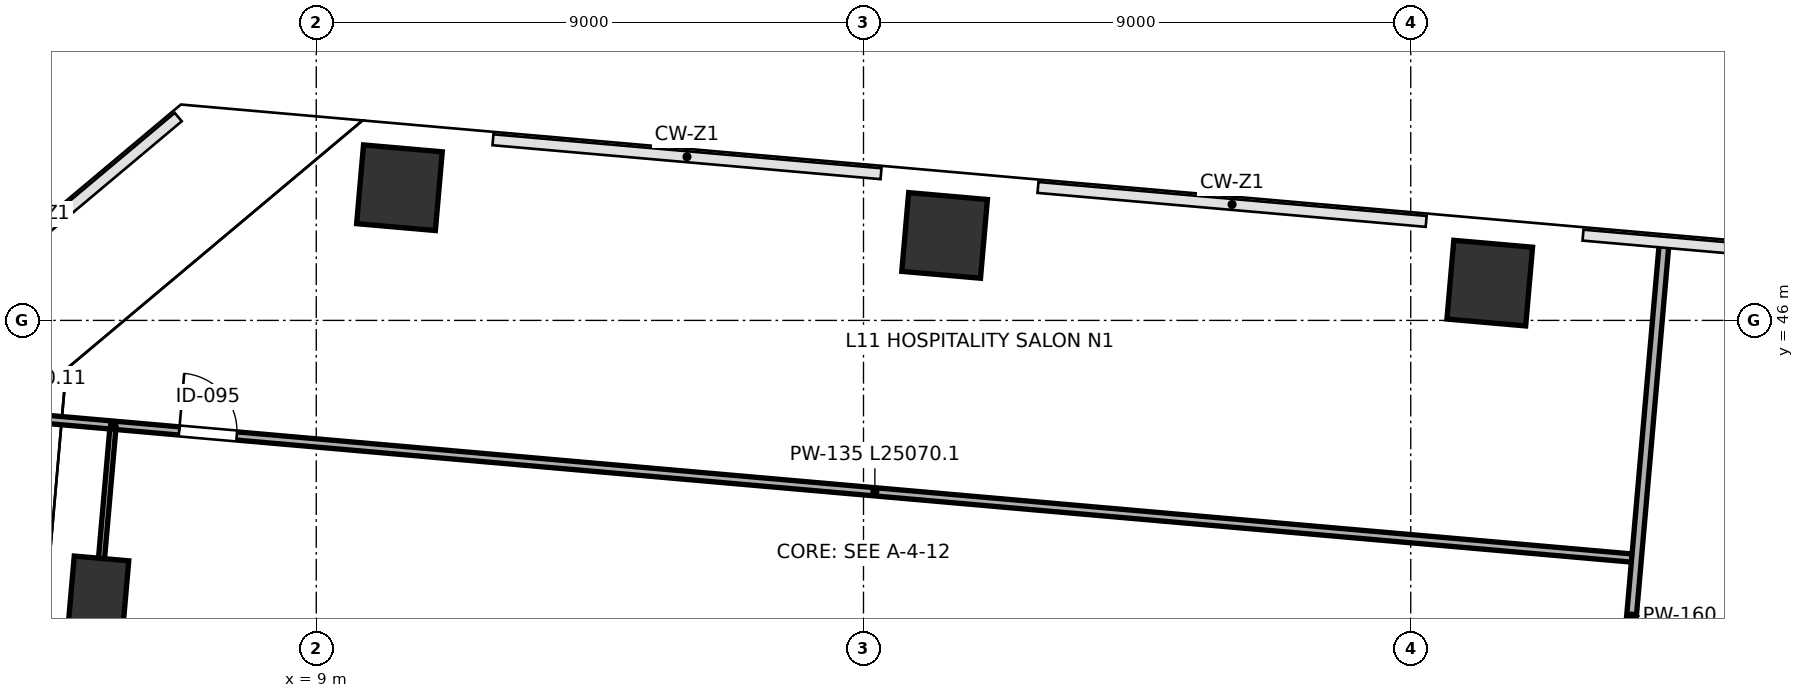
"""IFC4 building model, lengths in metres.
Left out: names, types, materials, properties, quantities, classifications, styles, units other than length and angle.
Written with IfcOpenShell. Run it as: python <this file> out.ifc"""

import sys

from ifc_helpers import new_model, si_unit, direction, frame, frame_2d, origin, origin_2d, place, context, subcontext, project, spatial, rectangle, extrude, clip, halfspace, source, transform, mapped, element, fill, save


model = new_model("IFC4")
c1 = context("Model", 3, precision=1e-05, world=origin(), true_north=direction((0.0, 1.0)))
c2 = subcontext(c1, "Body", "Model", "MODEL_VIEW")
j1 = project(units=[si_unit("LENGTHUNIT", "METRE"), si_unit("PLANEANGLEUNIT", "RADIAN")], contexts=[c1])
p1 = place(None, origin())
s1 = spatial("IfcSite", under=j1, at=p1, CompositionType="ELEMENT")
p2 = place(p1, origin())
s2 = spatial("IfcBuilding", under=s1, at=p2, CompositionType="ELEMENT")
p3 = place(p2, frame((0.0, 0.0, 52.0)))
s3 = spatial("IfcBuildingStorey", under=s2, at=p3, CompositionType="ELEMENT", Elevation=52.0)
p4 = place(p3, frame((10.368, 48.182, 0.0), z_axis=(0.073812496788, 0.049596729139, 0.996038091529), x_axis=(0.483542762655, -0.875286424907, 0.007750552098)))
e1 = element("IfcColumn", 1, at=p4, inside=s3, PredefinedType="COLUMN", context=c2, shape_type="Clipping", body=[
    clip(clip(extrude(rectangle(XDim=1.3, YDim=1.3, at=origin_2d()), origin(), (0.0, 0.0, 1.0), 4.819), halfspace(frame((0.0, 0.0, 0.063), z_axis=(0.0, 0.0, -1.0), x_axis=(1.0, 0.0, 0.0)), False)), halfspace(frame((0.0, 0.0, 4.756), z_axis=(0.0, 0.0, 1.0), x_axis=(1.0, 0.0, 0.0)), False)),
])
p5 = place(p3, frame((19.334, 47.397, 0.0), z_axis=(0.06991362438, 0.009030932612, 0.99751216904), x_axis=(0.041398310106, -0.999123831761, 0.006143999325)))
e2 = element("IfcColumn", 2, at=p5, inside=s3, PredefinedType="COLUMN", context=c2, shape_type="Clipping", body=[
    clip(clip(extrude(rectangle(XDim=1.3, YDim=1.3, at=origin_2d()), origin(), (0.0, 0.0, 1.0), 4.812), halfspace(frame((0.0, 0.0, 0.051), z_axis=(0.0, 0.0, -1.0), x_axis=(1.0, 0.0, 0.0)), False)), halfspace(frame((0.0, 0.0, 4.761), z_axis=(0.0, 0.0, 1.0), x_axis=(1.0, 0.0, 0.0)), False)),
])
p6 = place(p3, frame((28.3, 46.613, 0.0), z_axis=(0.06589332662, -0.031551692962, 0.997327709521), x_axis=(-0.508628404155, -0.860962602344, 0.006367405439)))
e3 = element("IfcColumn", 3, at=p6, inside=s3, PredefinedType="COLUMN", context=c2, shape_type="Clipping", body=[
    clip(clip(extrude(rectangle(XDim=1.3, YDim=1.3, at=origin_2d()), origin(), (0.0, 0.0, 1.0), 4.813), halfspace(frame((0.0, 0.0, 0.052), z_axis=(0.0, 0.0, -1.0), x_axis=(1.0, 0.0, 0.0)), False)), halfspace(frame((0.0, 0.0, 4.761), z_axis=(0.0, 0.0, 1.0), x_axis=(1.0, 0.0, 0.0)), False)),
])
p7 = place(p3, frame((5.411, 41.438, 0.0), z_axis=(0.0435342962, 0.072422013119, 0.996423512905), x_axis=(0.809065713617, -0.587672045735, 0.007364625673)))
e4 = element("IfcColumn", 4, at=p7, inside=s3, PredefinedType="PILASTER", context=c2, shape_type="Clipping", body=[
    clip(clip(extrude(rectangle(XDim=0.9, YDim=1.3, at=origin_2d()), origin(), (0.0, 0.0, 1.0), 4.817), halfspace(frame((0.0, 0.0, 0.059), z_axis=(0.0, 0.0, -1.0), x_axis=(1.0, 0.0, 0.0)), False)), halfspace(frame((0.0, 0.0, 4.758), z_axis=(0.0, 0.0, 1.0), x_axis=(1.0, 0.0, 0.0)), False)),
])
p8 = place(p3, frame((5.7, 44.274, 0.0), z_axis=(0.0, 0.0, 1.0), x_axis=(0.996195324028, -0.087148587968, 0.0)))
e5 = element("IfcWall", 5, at=p8, inside=s3, PredefinedType="PARTITIONING", context=c2, shape_type="SweptSolid", body=[
    extrude(rectangle(XDim=25.07, YDim=0.135, at=frame_2d((12.535, 0.0))), origin(), (0.0, 0.0, 1.0), 4.56),
])
p9 = place(p8, frame((1.05, 0.0, 0.0)))
e6 = element("IfcOpeningElement", 6, at=p9, cuts=e5, PredefinedType="OPENING", context=c2, shape_type="SweptSolid", body=[
    extrude(rectangle(XDim=0.95, YDim=2.15, at=frame_2d((0.475, 1.075))), frame((0.0, 0.078, 0.0), z_axis=(0.0, -1.0, 0.0), x_axis=(1.0, 0.0, 0.0)), (0.0, 0.0, 1.0), 0.155),
])
p10 = place(p3, frame((3.61, 20.847, 0.0), z_axis=(0.0, 0.0, 1.0), x_axis=(0.087153664928, 0.996194879875, 0.0)))
e7 = element("IfcWall", 7, at=p10, inside=s3, PredefinedType="PARTITIONING", context=c2, shape_type="SweptSolid", body=[
    extrude(rectangle(XDim=23.48, YDim=0.1, at=frame_2d((11.74, 0.0))), origin(), (0.0, 0.0, 1.0), 3.395),
])
p11 = place(p10, frame((1.4, 0.0, 0.0)))
e8 = element("IfcOpeningElement", 8, at=p11, cuts=e7, PredefinedType="OPENING", context=c2, shape_type="SweptSolid", body=[
    extrude(rectangle(XDim=0.95, YDim=2.15, at=frame_2d((0.475, 1.075))), frame((0.0, 0.06, 0.0), z_axis=(0.0, -1.0, 0.0), x_axis=(1.0, 0.0, 0.0)), (0.0, 0.0, 1.0), 0.12),
])
p12 = place(p3, frame((2.004, 44.597, 0.0), z_axis=(0.0, 0.0, 1.0), x_axis=(0.996194520424, -0.087157773474, 0.0)))
e9 = element("IfcWall", 9, at=p12, inside=s3, PredefinedType="PARTITIONING", context=c2, shape_type="SweptSolid", body=[
    extrude(rectangle(XDim=3.63, YDim=0.135, at=frame_2d((1.815, 0.0))), origin(), (0.0, 0.0, 1.0), 4.56),
])
p13 = place(p3, frame((30.098, 35.042, 0.0), z_axis=(0.0, 0.0, 1.0), x_axis=(0.087145176091, 0.996195622498, 0.0)))
e10 = element("IfcWall", 10, at=p13, inside=s3, PredefinedType="PARTITIONING", context=c2, shape_type="SweptSolid", body=[
    extrude(rectangle(XDim=12.24, YDim=0.16, at=frame_2d((6.12, 0.0))), origin(), (0.0, 0.0, 1.0), 3.695),
])
m1 = source(origin(), c2, "Body", "SweptSolid", [
    extrude(rectangle(XDim=0.95, YDim=2.15, at=frame_2d((0.475, 1.075))), frame((0.0, 0.025, 0.0), z_axis=(0.0, -1.0, 0.0), x_axis=(1.0, 0.0, 0.0)), (0.0, 0.0, 1.0), 0.05),
])
p14 = place(p9, origin())
e11 = element("IfcDoor", 11, at=p14, inside=s3, OperationType="SINGLE_SWING_LEFT", PredefinedType="DOOR", context=c2, shape_type="MappedRepresentation", body=[
    mapped(m1, transform((0.0, 0.0, 0.0), scale=1.0)),
])
fill(e6, e11)
save(model, sys.argv[1])
